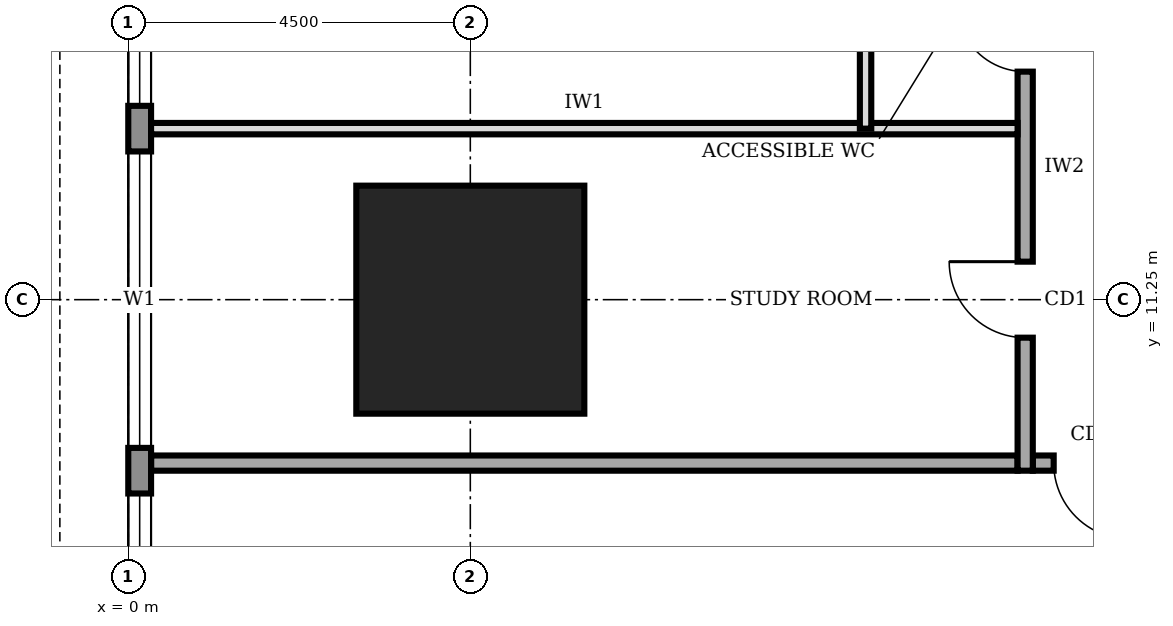
"""IFC4 building model, lengths in metres.
Left out: names, types, materials, properties, quantities, classifications, styles, units other than length and angle.
Written with IfcOpenShell. Run it as: python <this file> out.ifc"""

import sys

from ifc_helpers import new_model, si_unit, direction, frame, frame_2d, origin, origin_2d, place, context, subcontext, project, spatial, rectangle, extrude, element, fill, save


model = new_model("IFC4")
c1 = context("Model", 3, precision=1e-05, world=origin(), true_north=direction((0.0, 1.0)))
c2 = subcontext(c1, "Body", "Model", "MODEL_VIEW")
j1 = project(units=[si_unit("LENGTHUNIT", "METRE"), si_unit("PLANEANGLEUNIT", "RADIAN")], contexts=[c1])
p1 = place(None, origin())
s1 = spatial("IfcSite", under=j1, at=p1, CompositionType="ELEMENT")
p2 = place(p1, origin())
s2 = spatial("IfcBuilding", under=s1, at=p2, CompositionType="ELEMENT")
p3 = place(p2, frame((0.0, 0.0, 41.0)))
s3 = spatial("IfcBuildingStorey", under=s2, at=p3, CompositionType="ELEMENT", Elevation=41.0)
p4 = place(p3, frame((4.5, 11.25, 0.0), z_axis=(0.0, 0.0, 1.0), x_axis=(1.0, 0.0, 0.0)))
e1 = element("IfcColumn", 1, at=p4, inside=s3, PredefinedType="COLUMN", context=c2, shape_type="SweptSolid", body=[
    extrude(rectangle(XDim=3.0, YDim=3.0, at=origin_2d()), origin(), (0.0, 0.0, 1.0), 4.0),
])
p5 = place(p3, frame((0.15, 35.98, 0.0), z_axis=(0.0, 0.0, 1.0), x_axis=(0.0, -1.0, 0.0)))
e2 = element("IfcWall", 2, at=p5, inside=s3, PredefinedType="STANDARD", context=c2, shape_type="SweptSolid", body=[
    extrude(rectangle(XDim=31.46, YDim=0.3, at=frame_2d((15.73, 0.0))), origin(), (0.0, 0.0, 1.0), 3.75),
])
p6 = place(p5, frame((27.28, 0.0, 0.9)))
e3 = element("IfcOpeningElement", 3, at=p6, cuts=e2, PredefinedType="OPENING", context=c2, shape_type="SweptSolid", body=[
    extrude(rectangle(XDim=3.9, YDim=2.2, at=frame_2d((1.95, 1.1))), frame((0.0, 0.16, 0.0), z_axis=(0.0, -1.0, 0.0), x_axis=(1.0, 0.0, 0.0)), (0.0, 0.0, 1.0), 0.32),
])
p7 = place(p5, frame((22.78, 0.0, 0.9)))
e4 = element("IfcOpeningElement", 4, at=p7, cuts=e2, PredefinedType="OPENING", context=c2, shape_type="SweptSolid", body=[
    extrude(rectangle(XDim=3.9, YDim=2.2, at=frame_2d((1.95, 1.1))), frame((0.0, 0.16, 0.0), z_axis=(0.0, -1.0, 0.0), x_axis=(1.0, 0.0, 0.0)), (0.0, 0.0, 1.0), 0.32),
])
p8 = place(p5, frame((18.28, 0.0, 0.9)))
e5 = element("IfcOpeningElement", 5, at=p8, cuts=e2, PredefinedType="OPENING", context=c2, shape_type="SweptSolid", body=[
    extrude(rectangle(XDim=3.9, YDim=2.2, at=frame_2d((1.95, 1.1))), frame((0.0, 0.16, 0.0), z_axis=(0.0, -1.0, 0.0), x_axis=(1.0, 0.0, 0.0)), (0.0, 0.0, 1.0), 0.32),
])
p9 = place(p5, frame((13.78, 0.0, 0.9)))
e6 = element("IfcOpeningElement", 6, at=p9, cuts=e2, PredefinedType="OPENING", context=c2, shape_type="SweptSolid", body=[
    extrude(rectangle(XDim=3.9, YDim=2.2, at=frame_2d((1.95, 1.1))), frame((0.0, 0.16, 0.0), z_axis=(0.0, -1.0, 0.0), x_axis=(1.0, 0.0, 0.0)), (0.0, 0.0, 1.0), 0.32),
])
p10 = place(p5, frame((9.28, 0.0, 0.9)))
e7 = element("IfcOpeningElement", 7, at=p10, cuts=e2, PredefinedType="OPENING", context=c2, shape_type="SweptSolid", body=[
    extrude(rectangle(XDim=3.9, YDim=2.2, at=frame_2d((1.95, 1.1))), frame((0.0, 0.16, 0.0), z_axis=(0.0, -1.0, 0.0), x_axis=(1.0, 0.0, 0.0)), (0.0, 0.0, 1.0), 0.32),
])
p11 = place(p5, frame((4.78, 0.0, 0.9)))
e8 = element("IfcOpeningElement", 8, at=p11, cuts=e2, PredefinedType="OPENING", context=c2, shape_type="SweptSolid", body=[
    extrude(rectangle(XDim=3.9, YDim=2.2, at=frame_2d((1.95, 1.1))), frame((0.0, 0.16, 0.0), z_axis=(0.0, -1.0, 0.0), x_axis=(1.0, 0.0, 0.0)), (0.0, 0.0, 1.0), 0.32),
])
p12 = place(p3, frame((11.9, 9.1, 0.0), z_axis=(0.0, 0.0, 1.0), x_axis=(1.0, 0.0, 0.0)))
e9 = element("IfcWall", 9, at=p12, inside=s3, PredefinedType="SOLIDWALL", context=c2, shape_type="SweptSolid", body=[
    extrude(rectangle(XDim=18.4, YDim=0.2, at=frame_2d((9.2, 0.0))), origin(), (0.0, 0.0, 1.0), 3.75),
])
p13 = place(p12, frame((0.275, 0.0, 0.0)))
e10 = element("IfcOpeningElement", 10, at=p13, cuts=e9, PredefinedType="OPENING", context=c2, shape_type="SweptSolid", body=[
    extrude(rectangle(XDim=1.0, YDim=2.1, at=frame_2d((0.5, 1.05))), frame((0.0, 0.11, 0.0), z_axis=(0.0, -1.0, 0.0), x_axis=(1.0, 0.0, 0.0)), (0.0, 0.0, 1.0), 0.22),
])
p14 = place(p12, frame((3.35, 0.0, 0.0)))
e11 = element("IfcOpeningElement", 11, at=p14, cuts=e9, PredefinedType="OPENING", context=c2, shape_type="SweptSolid", body=[
    extrude(rectangle(XDim=1.0, YDim=2.1, at=frame_2d((0.5, 1.05))), frame((0.0, 0.11, 0.0), z_axis=(0.0, -1.0, 0.0), x_axis=(1.0, 0.0, 0.0)), (0.0, 0.0, 1.0), 0.22),
])
p15 = place(p12, frame((10.1, 0.0, 0.0)))
e12 = element("IfcOpeningElement", 12, at=p15, cuts=e9, PredefinedType="OPENING", context=c2, shape_type="SweptSolid", body=[
    extrude(rectangle(XDim=1.0, YDim=2.1, at=frame_2d((0.5, 1.05))), frame((0.0, 0.11, 0.0), z_axis=(0.0, -1.0, 0.0), x_axis=(1.0, 0.0, 0.0)), (0.0, 0.0, 1.0), 0.22),
])
p16 = place(p12, frame((15.85, 0.0, 0.0)))
e13 = element("IfcOpeningElement", 13, at=p16, cuts=e9, PredefinedType="OPENING", context=c2, shape_type="SweptSolid", body=[
    extrude(rectangle(XDim=1.8, YDim=2.1, at=frame_2d((0.9, 1.05))), frame((0.0, 0.11, 0.0), z_axis=(0.0, -1.0, 0.0), x_axis=(1.0, 0.0, 0.0)), (0.0, 0.0, 1.0), 0.22),
])
p17 = place(p3, frame((11.8, 31.3, 0.0), z_axis=(0.0, 0.0, 1.0), x_axis=(0.0, -1.0, 0.0)))
e14 = element("IfcWall", 14, at=p17, inside=s3, PredefinedType="SOLIDWALL", context=c2, shape_type="SweptSolid", body=[
    extrude(rectangle(XDim=22.3, YDim=0.2, at=frame_2d((11.15, 0.0))), origin(), (0.0, 0.0, 1.0), 3.75),
])
p18 = place(p17, frame((19.55, 0.0, 0.0)))
e15 = element("IfcOpeningElement", 15, at=p18, cuts=e14, PredefinedType="OPENING", context=c2, shape_type="SweptSolid", body=[
    extrude(rectangle(XDim=1.0, YDim=2.1, at=frame_2d((0.5, 1.05))), frame((0.0, 0.11, 0.0), z_axis=(0.0, -1.0, 0.0), x_axis=(1.0, 0.0, 0.0)), (0.0, 0.0, 1.0), 0.22),
])
p19 = place(p17, frame((16.15, 0.0, 0.0)))
e16 = element("IfcOpeningElement", 16, at=p19, cuts=e14, PredefinedType="OPENING", context=c2, shape_type="SweptSolid", body=[
    extrude(rectangle(XDim=0.9, YDim=2.1, at=frame_2d((0.45, 1.05))), frame((0.0, 0.11, 0.0), z_axis=(0.0, -1.0, 0.0), x_axis=(1.0, 0.0, 0.0)), (0.0, 0.0, 1.0), 0.22),
])
p20 = place(p17, frame((12.95, 0.0, 0.0)))
e17 = element("IfcOpeningElement", 17, at=p20, cuts=e14, PredefinedType="OPENING", context=c2, shape_type="SweptSolid", body=[
    extrude(rectangle(XDim=0.9, YDim=2.1, at=frame_2d((0.45, 1.05))), frame((0.0, 0.11, 0.0), z_axis=(0.0, -1.0, 0.0), x_axis=(1.0, 0.0, 0.0)), (0.0, 0.0, 1.0), 0.22),
])
p21 = place(p17, frame((7.4, 0.0, 0.0)))
e18 = element("IfcOpeningElement", 18, at=p21, cuts=e14, PredefinedType="OPENING", context=c2, shape_type="SweptSolid", body=[
    extrude(rectangle(XDim=0.9, YDim=2.1, at=frame_2d((0.45, 1.05))), frame((0.0, 0.11, 0.0), z_axis=(0.0, -1.0, 0.0), x_axis=(1.0, 0.0, 0.0)), (0.0, 0.0, 1.0), 0.22),
])
p22 = place(p17, frame((4.8, 0.0, 0.0)))
e19 = element("IfcOpeningElement", 19, at=p22, cuts=e14, PredefinedType="OPENING", context=c2, shape_type="SweptSolid", body=[
    extrude(rectangle(XDim=1.0, YDim=2.1, at=frame_2d((0.5, 1.05))), frame((0.0, 0.11, 0.0), z_axis=(0.0, -1.0, 0.0), x_axis=(1.0, 0.0, 0.0)), (0.0, 0.0, 1.0), 0.22),
])
p23 = place(p17, frame((9.9, 0.0, 0.0)))
e20 = element("IfcOpeningElement", 20, at=p23, cuts=e14, PredefinedType="OPENING", context=c2, shape_type="SweptSolid", body=[
    extrude(rectangle(XDim=1.0, YDim=2.1, at=frame_2d((0.5, 1.05))), frame((0.0, 0.11, 0.0), z_axis=(0.0, -1.0, 0.0), x_axis=(1.0, 0.0, 0.0)), (0.0, 0.0, 1.0), 0.22),
])
p24 = place(p17, frame((1.55, 0.0, 0.0)))
e21 = element("IfcOpeningElement", 21, at=p24, cuts=e14, PredefinedType="OPENING", context=c2, shape_type="SweptSolid", body=[
    extrude(rectangle(XDim=1.0, YDim=2.1, at=frame_2d((0.5, 1.05))), frame((0.0, 0.11, 0.0), z_axis=(0.0, -1.0, 0.0), x_axis=(1.0, 0.0, 0.0)), (0.0, 0.0, 1.0), 0.22),
])
p25 = place(p3, frame((0.3, 9.1, 0.0), z_axis=(0.0, 0.0, 1.0), x_axis=(1.0, 0.0, 0.0)))
e22 = element("IfcWall", 22, at=p25, inside=s3, PredefinedType="SOLIDWALL", context=c2, shape_type="SweptSolid", body=[
    extrude(rectangle(XDim=11.4, YDim=0.2, at=frame_2d((5.7, 0.0))), origin(), (0.0, 0.0, 1.0), 3.75),
])
p26 = place(p3, frame((0.3, 13.5, 0.0), z_axis=(0.0, 0.0, 1.0), x_axis=(1.0, 0.0, 0.0)))
e23 = element("IfcWall", 23, at=p26, inside=s3, PredefinedType="PARTITIONING", context=c2, shape_type="SweptSolid", body=[
    extrude(rectangle(XDim=11.4, YDim=0.15, at=frame_2d((5.7, 0.0))), origin(), (0.0, 0.0, 1.0), 3.75),
])
p27 = place(p3, frame((9.7, 13.5, 0.0), z_axis=(0.0, 0.0, 1.0), x_axis=(0.0, 1.0, 0.0)))
e24 = element("IfcWall", 24, at=p27, inside=s3, PredefinedType="PARTITIONING", context=c2, shape_type="SweptSolid", body=[
    extrude(rectangle(XDim=2.4, YDim=0.15, at=frame_2d((1.2, 0.0))), origin(), (0.0, 0.0, 1.0), 3.75),
])
p28 = place(p6, origin())
e25 = element("IfcWindow", 25, at=p28, inside=s3, PartitioningType="SINGLE_PANEL", PredefinedType="WINDOW", context=c2, shape_type="SweptSolid", body=[
    extrude(rectangle(XDim=3.9, YDim=2.2, at=frame_2d((1.95, 1.1))), frame((0.0, 0.03, 0.0), z_axis=(0.0, -1.0, 0.0), x_axis=(1.0, 0.0, 0.0)), (0.0, 0.0, 1.0), 0.06),
])
fill(e3, e25)
p29 = place(p7, origin())
e26 = element("IfcWindow", 26, at=p29, inside=s3, PartitioningType="SINGLE_PANEL", PredefinedType="WINDOW", context=c2, shape_type="SweptSolid", body=[
    extrude(rectangle(XDim=3.9, YDim=2.2, at=frame_2d((1.95, 1.1))), frame((0.0, 0.03, 0.0), z_axis=(0.0, -1.0, 0.0), x_axis=(1.0, 0.0, 0.0)), (0.0, 0.0, 1.0), 0.06),
])
fill(e4, e26)
p30 = place(p8, origin())
e27 = element("IfcWindow", 27, at=p30, inside=s3, PartitioningType="SINGLE_PANEL", PredefinedType="WINDOW", context=c2, shape_type="SweptSolid", body=[
    extrude(rectangle(XDim=3.9, YDim=2.2, at=frame_2d((1.95, 1.1))), frame((0.0, 0.03, 0.0), z_axis=(0.0, -1.0, 0.0), x_axis=(1.0, 0.0, 0.0)), (0.0, 0.0, 1.0), 0.06),
])
fill(e5, e27)
p31 = place(p13, frame((1.0, 0.0, 0.0), z_axis=(0.0, 0.0, 1.0), x_axis=(-1.0, 0.0, 0.0)))
e28 = element("IfcDoor", 28, at=p31, inside=s3, OperationType="SINGLE_SWING_LEFT", PredefinedType="DOOR", context=c2, shape_type="SweptSolid", body=[
    extrude(rectangle(XDim=1.0, YDim=2.1, at=frame_2d((0.5, 1.05))), frame((0.0, 0.025, 0.0), z_axis=(0.0, -1.0, 0.0), x_axis=(1.0, 0.0, 0.0)), (0.0, 0.0, 1.0), 0.05),
])
fill(e10, e28)
p32 = place(p18, frame((1.0, 0.0, 0.0), z_axis=(0.0, 0.0, 1.0), x_axis=(-1.0, 0.0, 0.0)))
e29 = element("IfcDoor", 29, at=p32, inside=s3, OperationType="SINGLE_SWING_RIGHT", PredefinedType="DOOR", context=c2, shape_type="SweptSolid", body=[
    extrude(rectangle(XDim=1.0, YDim=2.1, at=frame_2d((0.5, 1.05))), frame((0.0, 0.025, 0.0), z_axis=(0.0, -1.0, 0.0), x_axis=(1.0, 0.0, 0.0)), (0.0, 0.0, 1.0), 0.05),
])
fill(e15, e29)
p33 = place(p19, frame((0.9, 0.0, 0.0), z_axis=(0.0, 0.0, 1.0), x_axis=(-1.0, 0.0, 0.0)))
e30 = element("IfcDoor", 30, at=p33, inside=s3, OperationType="SINGLE_SWING_RIGHT", PredefinedType="DOOR", context=c2, shape_type="SweptSolid", body=[
    extrude(rectangle(XDim=0.9, YDim=2.1, at=frame_2d((0.45, 1.05))), frame((0.0, 0.025, 0.0), z_axis=(0.0, -1.0, 0.0), x_axis=(1.0, 0.0, 0.0)), (0.0, 0.0, 1.0), 0.05),
])
fill(e16, e30)
save(model, sys.argv[1])
